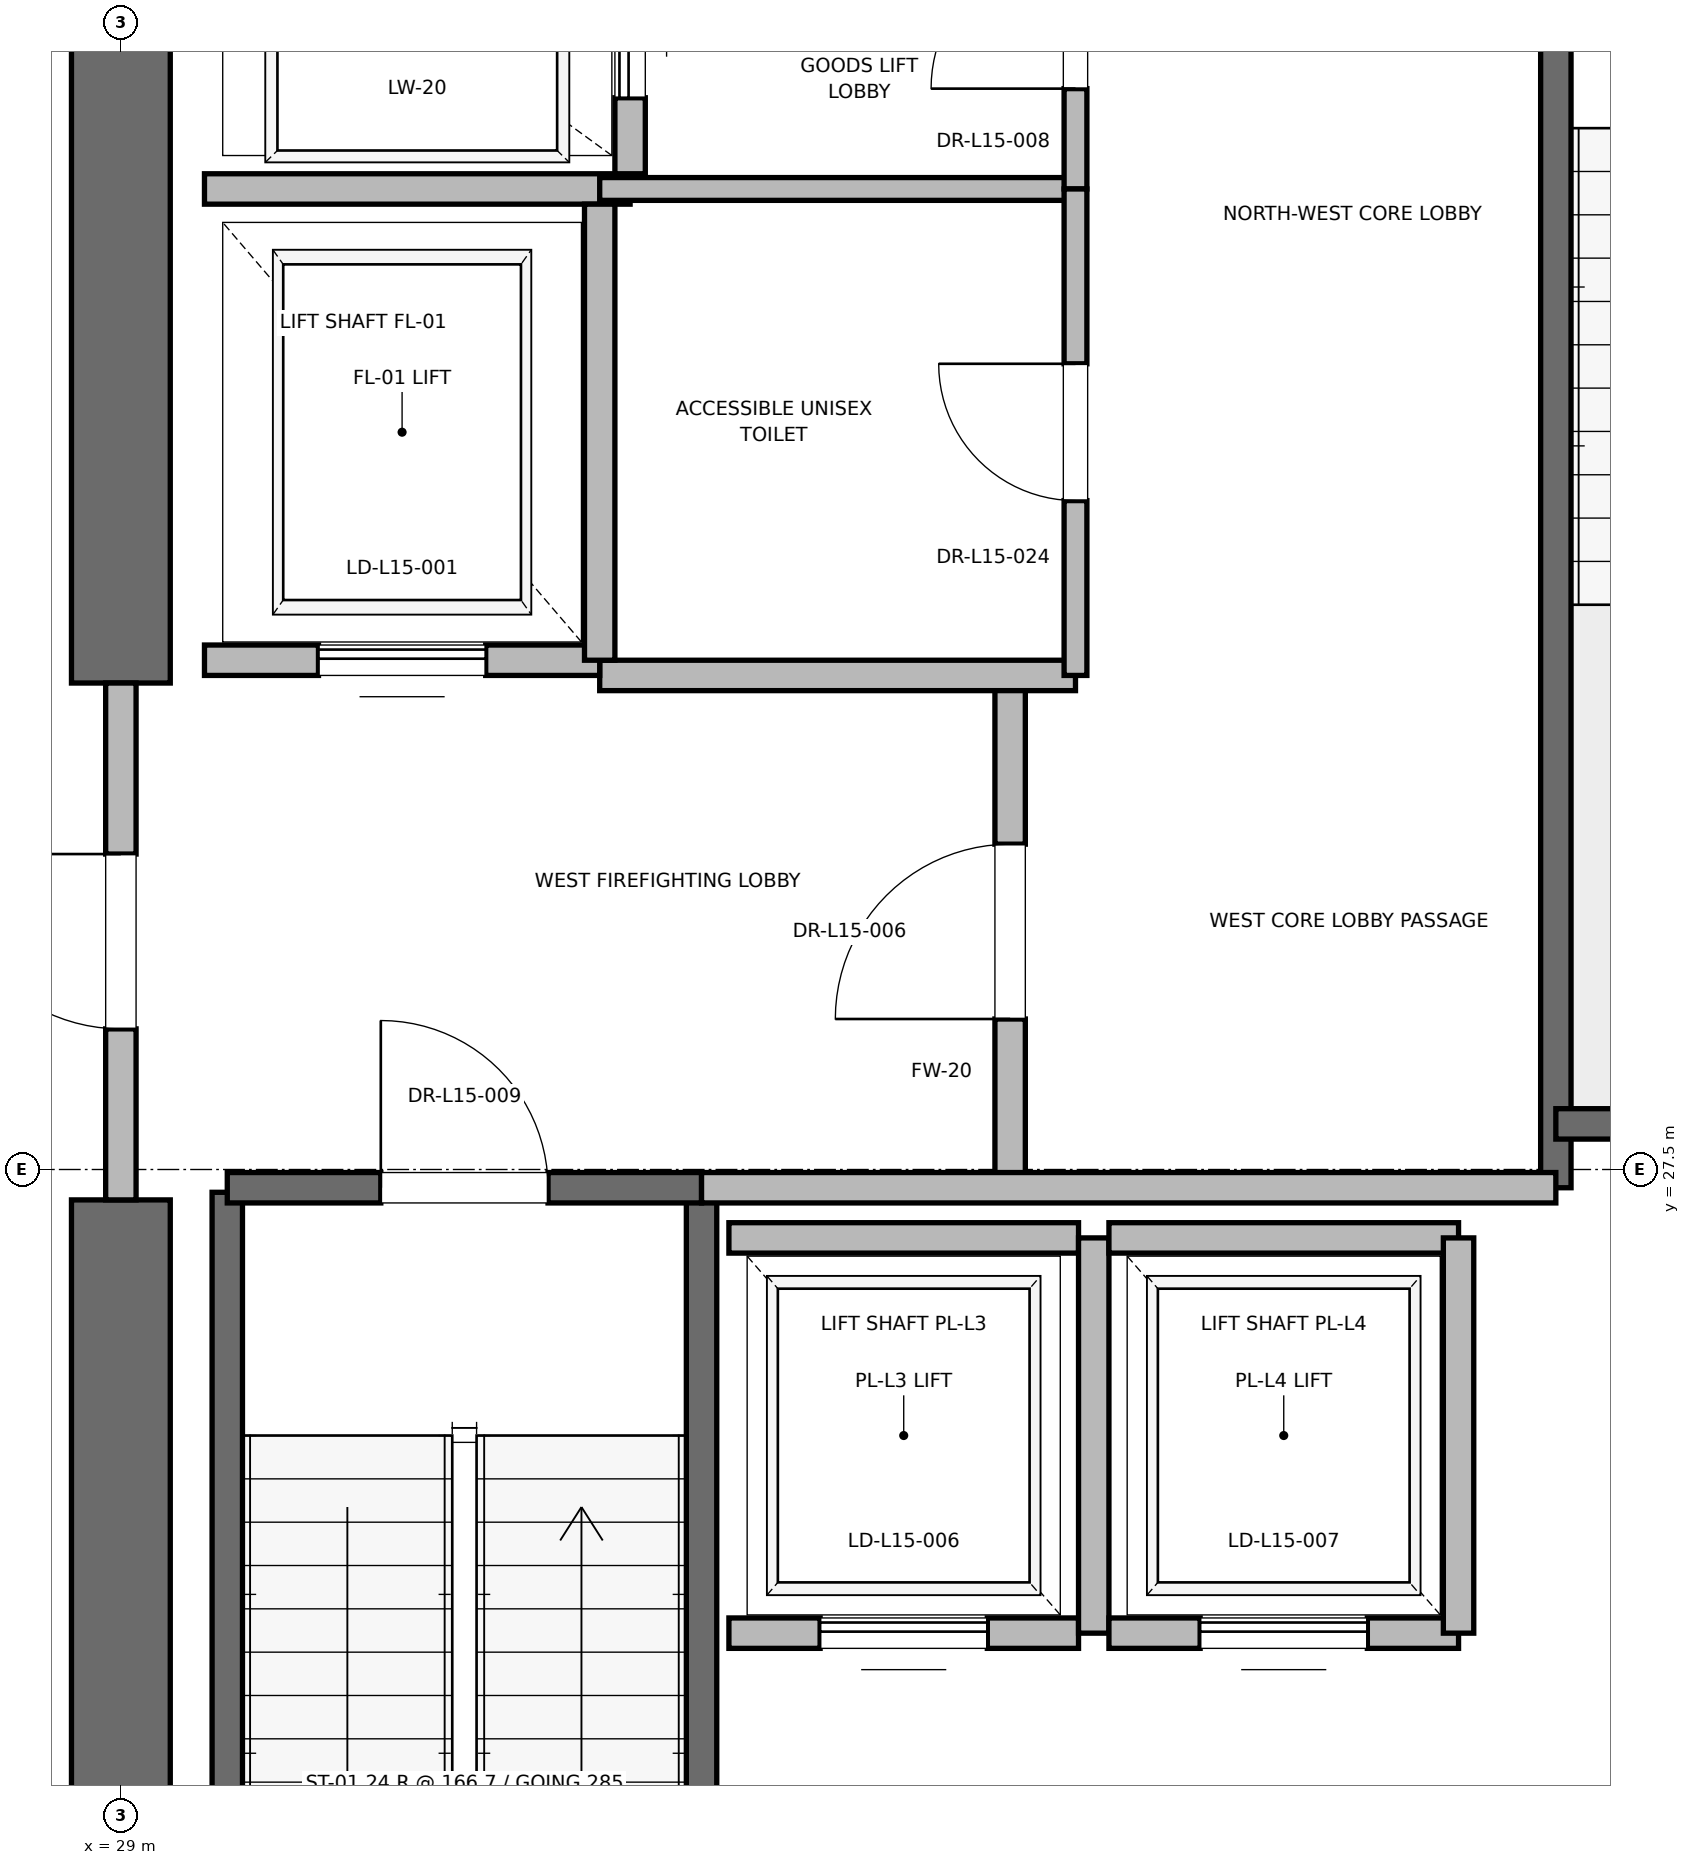
"""IFC4 building model, lengths in metres.
Left out: names, types, materials, properties, quantities, classifications, styles, units other than length and angle.
Written with IfcOpenShell. Run it as: python <this file> out.ifc"""

import sys

from ifc_helpers import new_model, si_unit, direction, frame, frame_2d, origin, place, context, subcontext, project, spatial, rectangle, extrude, element, fill, save


model = new_model("IFC4")
c1 = context("Model", 3, precision=1e-05, world=origin(), true_north=direction((0.0, 1.0)))
c2 = subcontext(c1, "Body", "Model", "MODEL_VIEW")
j1 = project(units=[si_unit("LENGTHUNIT", "METRE"), si_unit("PLANEANGLEUNIT", "RADIAN")], contexts=[c1])
p1 = place(None, origin())
s1 = spatial("IfcSite", under=j1, at=p1, CompositionType="ELEMENT")
p2 = place(p1, origin())
s2 = spatial("IfcBuilding", under=s1, at=p2, CompositionType="ELEMENT")
p3 = place(p2, frame((0.0, 0.0, 67.6)))
s3 = spatial("IfcBuildingStorey", under=s2, at=p3, CompositionType="ELEMENT", Elevation=67.6)
p4 = place(p3, frame((29.0, 18.5, 0.0), z_axis=(0.0, 0.0, 1.0), x_axis=(0.0, 1.0, 0.0)))
e1 = element("IfcWall", 1, at=p4, inside=s3, PredefinedType="SHEAR", context=c2, shape_type="SweptSolid", body=[
    extrude(rectangle(XDim=8.8, YDim=0.65, at=frame_2d((4.4, 0.0))), origin(), (0.0, 0.0, 1.0), 3.76),
])
p5 = place(p3, frame((29.0, 30.7, 0.0), z_axis=(0.0, 0.0, 1.0), x_axis=(0.0, 1.0, 0.0)))
e2 = element("IfcWall", 2, at=p5, inside=s3, PredefinedType="SHEAR", context=c2, shape_type="SweptSolid", body=[
    extrude(rectangle(XDim=5.8, YDim=0.65, at=frame_2d((2.9, 0.0))), origin(), (0.0, 0.0, 1.0), 3.76),
])
p6 = place(p3, frame((29.7, 19.2, 0.0), z_axis=(0.0, 0.0, 1.0), x_axis=(0.0, 1.0, 0.0)))
e3 = element("IfcWall", 3, at=p6, inside=s3, PredefinedType="SOLIDWALL", context=c2, shape_type="SweptSolid", body=[
    extrude(rectangle(XDim=8.15, YDim=0.2, at=frame_2d((4.075, 0.0))), origin(), (0.0, 0.0, 1.0), 3.76),
])
p7 = place(p3, frame((32.82, 18.6, 0.0), z_axis=(0.0, 0.0, 1.0), x_axis=(0.0, 1.0, 0.0)))
e4 = element("IfcWall", 4, at=p7, inside=s3, PredefinedType="SOLIDWALL", context=c2, shape_type="SweptSolid", body=[
    extrude(rectangle(XDim=8.78, YDim=0.2, at=frame_2d((4.39, 0.0))), origin(), (0.0, 0.0, 1.0), 3.76),
])
p8 = place(p3, frame((29.7, 27.38, 0.0), z_axis=(0.0, 0.0, 1.0), x_axis=(1.0, 0.0, 0.0)))
e5 = element("IfcWall", 5, at=p8, inside=s3, PredefinedType="SOLIDWALL", context=c2, shape_type="SweptSolid", body=[
    extrude(rectangle(XDim=3.12, YDim=0.2, at=frame_2d((1.56, 0.0))), origin(), (0.0, 0.0, 1.0), 3.76),
])
p9 = place(p8, frame((1.01, 0.0, 0.0)))
e6 = element("IfcOpeningElement", 6, at=p9, cuts=e5, PredefinedType="OPENING", context=c2, shape_type="SweptSolid", body=[
    extrude(rectangle(XDim=1.1, YDim=2.15, at=frame_2d((0.55, 1.075))), frame((0.0, 0.1, 0.0), z_axis=(0.0, -1.0, 0.0), x_axis=(1.0, 0.0, 0.0)), (0.0, 0.0, 1.0), 0.2),
])
p10 = place(p3, frame((38.44, 27.38, 0.0), z_axis=(0.0, 0.0, 1.0), x_axis=(0.0, 1.0, 0.0)))
e7 = element("IfcWall", 7, at=p10, inside=s3, PredefinedType="SOLIDWALL", context=c2, shape_type="SweptSolid", body=[
    extrude(rectangle(XDim=8.87, YDim=0.2, at=frame_2d((4.435, 0.0))), origin(), (0.0, 0.0, 1.0), 3.76),
])
p11 = place(p3, frame((38.44, 27.8, 0.0), z_axis=(0.0, 0.0, 1.0), x_axis=(1.0, 0.0, 0.0)))
e8 = element("IfcWall", 8, at=p11, inside=s3, PredefinedType="SOLIDWALL", context=c2, shape_type="SweptSolid", body=[
    extrude(rectangle(XDim=3.32, YDim=0.2, at=frame_2d((1.66, 0.0))), origin(), (0.0, 0.0, 1.0), 3.76),
])
p12 = place(p3, frame((34.85, 27.38, 0.0), z_axis=(0.0, 0.0, 1.0), x_axis=(0.0, 1.0, 0.0)))
e9 = element("IfcWall", 9, at=p12, inside=s3, PredefinedType="PARTITIONING", context=c2, shape_type="SweptSolid", body=[
    extrude(rectangle(XDim=3.37, YDim=0.2, at=frame_2d((1.685, 0.0))), origin(), (0.0, 0.0, 1.0), 3.76),
])
p13 = place(p12, frame((1.11, 0.0, 0.0)))
e10 = element("IfcOpeningElement", 10, at=p13, cuts=e9, PredefinedType="OPENING", context=c2, shape_type="SweptSolid", body=[
    extrude(rectangle(XDim=1.15, YDim=2.2, at=frame_2d((0.575, 1.1))), frame((0.0, 0.1, 0.0), z_axis=(0.0, -1.0, 0.0), x_axis=(1.0, 0.0, 0.0)), (0.0, 0.0, 1.0), 0.2),
])
p14 = place(p3, frame((29.0, 27.3, 0.0), z_axis=(0.0, 0.0, 1.0), x_axis=(0.0, 1.0, 0.0)))
e11 = element("IfcWall", 11, at=p14, inside=s3, PredefinedType="PARTITIONING", context=c2, shape_type="SweptSolid", body=[
    extrude(rectangle(XDim=3.4, YDim=0.2, at=frame_2d((1.7, 0.0))), origin(), (0.0, 0.0, 1.0), 2.54),
])
p15 = place(p14, frame((1.125, 0.0, 0.0)))
e12 = element("IfcOpeningElement", 12, at=p15, cuts=e11, PredefinedType="OPENING", context=c2, shape_type="SweptSolid", body=[
    extrude(rectangle(XDim=1.15, YDim=2.2, at=frame_2d((0.575, 1.1))), frame((0.0, 0.1, 0.0), z_axis=(0.0, -1.0, 0.0), x_axis=(1.0, 0.0, 0.0)), (0.0, 0.0, 1.0), 0.2),
])
p16 = place(p3, frame((32.82, 27.38, 0.0), z_axis=(0.0, 0.0, 1.0), x_axis=(1.0, 0.0, 0.0)))
e13 = element("IfcWall", 13, at=p16, inside=s3, PredefinedType="PARTITIONING", context=c2, shape_type="SweptSolid", body=[
    extrude(rectangle(XDim=5.62, YDim=0.2, at=frame_2d((2.81, 0.0))), origin(), (0.0, 0.0, 1.0), 3.76),
])
p17 = place(p3, frame((32.15, 30.75, 0.0), z_axis=(0.0, 0.0, 1.0), x_axis=(1.0, 0.0, 0.0)))
e14 = element("IfcWall", 14, at=p17, inside=s3, PredefinedType="PARTITIONING", context=c2, shape_type="SweptSolid", body=[
    extrude(rectangle(XDim=3.13, YDim=0.2, at=frame_2d((1.565, 0.0))), origin(), (0.0, 0.0, 1.0), 3.76),
])
p18 = place(p3, frame((29.55, 30.85, 0.0), z_axis=(0.0, 0.0, 1.0), x_axis=(1.0, 0.0, 0.0)))
e15 = element("IfcWall", 15, at=p18, inside=s3, PredefinedType="SOLIDWALL", context=c2, shape_type="SweptSolid", body=[
    extrude(rectangle(XDim=2.6, YDim=0.2, at=frame_2d((1.3, 0.0))), origin(), (0.0, 0.0, 1.0), 2.54),
])
p19 = place(p18, frame((0.75, 0.0, 0.0)))
e16 = element("IfcOpeningElement", 16, at=p19, cuts=e15, PredefinedType="OPENING", context=c2, shape_type="SweptSolid", body=[
    extrude(rectangle(XDim=1.1, YDim=2.2, at=frame_2d((0.55, 1.1))), frame((0.0, 0.1, 0.0), z_axis=(0.0, -1.0, 0.0), x_axis=(1.0, 0.0, 0.0)), (0.0, 0.0, 1.0), 0.2),
])
p20 = place(p3, frame((29.55, 33.95, 0.0), z_axis=(0.0, 0.0, 1.0), x_axis=(1.0, 0.0, 0.0)))
e17 = element("IfcWall", 17, at=p20, inside=s3, PredefinedType="SOLIDWALL", context=c2, shape_type="SweptSolid", body=[
    extrude(rectangle(XDim=2.8, YDim=0.2, at=frame_2d((1.4, 0.0))), origin(), (0.0, 0.0, 1.0), 3.76),
])
p21 = place(p3, frame((32.15, 30.85, 0.0), z_axis=(0.0, 0.0, 1.0), x_axis=(0.0, 1.0, 0.0)))
e18 = element("IfcWall", 18, at=p21, inside=s3, PredefinedType="SOLIDWALL", context=c2, shape_type="SweptSolid", body=[
    extrude(rectangle(XDim=3.0, YDim=0.2, at=frame_2d((1.5, 0.0))), origin(), (0.0, 0.0, 1.0), 3.76),
])
p22 = place(p3, frame((32.35, 34.05, 0.0), z_axis=(0.0, 0.0, 1.0), x_axis=(0.0, 1.0, 0.0)))
e19 = element("IfcWall", 19, at=p22, inside=s3, PredefinedType="SOLIDWALL", context=c2, shape_type="SweptSolid", body=[
    extrude(rectangle(XDim=2.1, YDim=0.2, at=frame_2d((1.05, 0.0))), origin(), (0.0, 0.0, 1.0), 3.76),
])
p23 = place(p22, frame((0.5, 0.0, 0.0)))
e20 = element("IfcOpeningElement", 20, at=p23, cuts=e19, PredefinedType="OPENING", context=c2, shape_type="SweptSolid", body=[
    extrude(rectangle(XDim=1.1, YDim=2.2, at=frame_2d((0.55, 1.1))), frame((0.0, 0.1, 0.0), z_axis=(0.0, -1.0, 0.0), x_axis=(1.0, 0.0, 0.0)), (0.0, 0.0, 1.0), 0.2),
])
p24 = place(p3, frame((33.0, 24.45, 0.0), z_axis=(0.0, 0.0, 1.0), x_axis=(1.0, 0.0, 0.0)))
e21 = element("IfcWall", 21, at=p24, inside=s3, PredefinedType="SOLIDWALL", context=c2, shape_type="SweptSolid", body=[
    extrude(rectangle(XDim=2.3, YDim=0.2, at=frame_2d((1.15, 0.0))), origin(), (0.0, 0.0, 1.0), 3.76),
])
p25 = place(p24, frame((0.6, 0.0, 0.0)))
e22 = element("IfcOpeningElement", 22, at=p25, cuts=e21, PredefinedType="OPENING", context=c2, shape_type="SweptSolid", body=[
    extrude(rectangle(XDim=1.1, YDim=2.2, at=frame_2d((0.55, 1.1))), frame((0.0, 0.1, 0.0), z_axis=(0.0, -1.0, 0.0), x_axis=(1.0, 0.0, 0.0)), (0.0, 0.0, 1.0), 0.2),
])
p26 = place(p3, frame((35.3, 27.05, 0.0), z_axis=(0.0, 0.0, 1.0), x_axis=(-1.0, 0.0, 0.0)))
e23 = element("IfcWall", 23, at=p26, inside=s3, PredefinedType="SOLIDWALL", context=c2, shape_type="SweptSolid", body=[
    extrude(rectangle(XDim=2.3, YDim=0.2, at=frame_2d((1.15, 0.0))), origin(), (0.0, 0.0, 1.0), 3.76),
])
p27 = place(p3, frame((35.4, 24.45, 0.0), z_axis=(0.0, 0.0, 1.0), x_axis=(0.0, 1.0, 0.0)))
e24 = element("IfcWall", 24, at=p27, inside=s3, PredefinedType="SOLIDWALL", context=c2, shape_type="SweptSolid", body=[
    extrude(rectangle(XDim=2.6, YDim=0.2, at=frame_2d((1.3, 0.0))), origin(), (0.0, 0.0, 1.0), 3.76),
])
p28 = place(p3, frame((35.5, 24.45, 0.0), z_axis=(0.0, 0.0, 1.0), x_axis=(1.0, 0.0, 0.0)))
e25 = element("IfcWall", 25, at=p28, inside=s3, PredefinedType="SOLIDWALL", context=c2, shape_type="SweptSolid", body=[
    extrude(rectangle(XDim=2.3, YDim=0.2, at=frame_2d((1.15, 0.0))), origin(), (0.0, 0.0, 1.0), 3.76),
])
p29 = place(p28, frame((0.6, 0.0, 0.0)))
e26 = element("IfcOpeningElement", 26, at=p29, cuts=e25, PredefinedType="OPENING", context=c2, shape_type="SweptSolid", body=[
    extrude(rectangle(XDim=1.1, YDim=2.2, at=frame_2d((0.55, 1.1))), frame((0.0, 0.1, 0.0), z_axis=(0.0, -1.0, 0.0), x_axis=(1.0, 0.0, 0.0)), (0.0, 0.0, 1.0), 0.2),
])
p30 = place(p3, frame((37.8, 27.05, 0.0), z_axis=(0.0, 0.0, 1.0), x_axis=(-1.0, 0.0, 0.0)))
e27 = element("IfcWall", 27, at=p30, inside=s3, PredefinedType="SOLIDWALL", context=c2, shape_type="SweptSolid", body=[
    extrude(rectangle(XDim=2.3, YDim=0.2, at=frame_2d((1.15, 0.0))), origin(), (0.0, 0.0, 1.0), 3.76),
])
p31 = place(p3, frame((37.8, 24.45, 0.0), z_axis=(0.0, 0.0, 1.0), x_axis=(0.0, 1.0, 0.0)))
e28 = element("IfcWall", 28, at=p31, inside=s3, PredefinedType="SOLIDWALL", context=c2, shape_type="SweptSolid", body=[
    extrude(rectangle(XDim=2.6, YDim=0.2, at=frame_2d((1.3, 0.0))), origin(), (0.0, 0.0, 1.0), 3.76),
])
p32 = place(p3, frame((32.15, 33.95, 0.0), z_axis=(0.0, 0.0, 1.0), x_axis=(1.0, 0.0, 0.0)))
e29 = element("IfcWall", 29, at=p32, inside=s3, PredefinedType="PARTITIONING", context=c2, shape_type="SweptSolid", body=[
    extrude(rectangle(XDim=3.13, YDim=0.15, at=frame_2d((1.565, 0.0))), origin(), (0.0, 0.0, 1.0), 2.85),
])
p33 = place(p3, frame((35.28, 33.95, 0.0), z_axis=(0.0, 0.0, 1.0), x_axis=(0.0, 1.0, 0.0)))
e30 = element("IfcWall", 30, at=p33, inside=s3, PredefinedType="PARTITIONING", context=c2, shape_type="SweptSolid", body=[
    extrude(rectangle(XDim=2.27, YDim=0.15, at=frame_2d((1.135, 0.0))), origin(), (0.0, 0.0, 1.0), 2.54),
])
p34 = place(p33, frame((0.66, 0.0, 0.0)))
e31 = element("IfcOpeningElement", 31, at=p34, cuts=e30, PredefinedType="OPENING", context=c2, shape_type="SweptSolid", body=[
    extrude(rectangle(XDim=0.95, YDim=2.15, at=frame_2d((0.475, 1.075))), frame((0.0, 0.075, 0.0), z_axis=(0.0, -1.0, 0.0), x_axis=(1.0, 0.0, 0.0)), (0.0, 0.0, 1.0), 0.15),
])
p35 = place(p3, frame((35.28, 30.75, 0.0), z_axis=(0.0, 0.0, 1.0), x_axis=(0.0, 1.0, 0.0)))
e32 = element("IfcWall", 32, at=p35, inside=s3, PredefinedType="PARTITIONING", context=c2, shape_type="SweptSolid", body=[
    extrude(rectangle(XDim=3.2, YDim=0.15, at=frame_2d((1.6, 0.0))), origin(), (0.0, 0.0, 1.0), 2.85),
])
p36 = place(p35, frame((1.15, 0.0, 0.0)))
e33 = element("IfcOpeningElement", 33, at=p36, cuts=e32, PredefinedType="OPENING", context=c2, shape_type="SweptSolid", body=[
    extrude(rectangle(XDim=0.9, YDim=2.1, at=frame_2d((0.45, 1.05))), frame((0.0, 0.075, 0.0), z_axis=(0.0, -1.0, 0.0), x_axis=(1.0, 0.0, 0.0)), (0.0, 0.0, 1.0), 0.15),
])
p37 = place(p9, origin())
e34 = element("IfcDoor", 34, at=p37, inside=s3, OperationType="SINGLE_SWING_LEFT", PredefinedType="DOOR", context=c2, shape_type="SweptSolid", body=[
    extrude(rectangle(XDim=1.1, YDim=2.15, at=frame_2d((0.55, 1.075))), frame((0.0, 0.025, 0.0), z_axis=(0.0, -1.0, 0.0), x_axis=(1.0, 0.0, 0.0)), (0.0, 0.0, 1.0), 0.05),
])
fill(e6, e34)
p38 = place(p13, origin())
e35 = element("IfcDoor", 35, at=p38, inside=s3, OperationType="SINGLE_SWING_LEFT", PredefinedType="DOOR", context=c2, shape_type="SweptSolid", body=[
    extrude(rectangle(XDim=1.15, YDim=2.2, at=frame_2d((0.575, 1.1))), frame((0.0, 0.025, 0.0), z_axis=(0.0, -1.0, 0.0), x_axis=(1.0, 0.0, 0.0)), (0.0, 0.0, 1.0), 0.05),
])
fill(e10, e35)
p39 = place(p15, origin())
e36 = element("IfcDoor", 36, at=p39, inside=s3, OperationType="SINGLE_SWING_RIGHT", PredefinedType="DOOR", context=c2, shape_type="SweptSolid", body=[
    extrude(rectangle(XDim=1.15, YDim=2.2, at=frame_2d((0.575, 1.1))), frame((0.0, 0.025, 0.0), z_axis=(0.0, -1.0, 0.0), x_axis=(1.0, 0.0, 0.0)), (0.0, 0.0, 1.0), 0.05),
])
fill(e12, e36)
p40 = place(p19, origin())
e37 = element("IfcDoor", 37, at=p40, inside=s3, OperationType="SLIDING_TO_RIGHT", PredefinedType="DOOR", context=c2, shape_type="SweptSolid", body=[
    extrude(rectangle(XDim=1.1, YDim=2.2, at=frame_2d((0.55, 1.1))), frame((0.0, 0.025, 0.0), z_axis=(0.0, -1.0, 0.0), x_axis=(1.0, 0.0, 0.0)), (0.0, 0.0, 1.0), 0.05),
])
fill(e16, e37)
p41 = place(p23, origin())
e38 = element("IfcDoor", 38, at=p41, inside=s3, OperationType="SLIDING_TO_RIGHT", PredefinedType="DOOR", context=c2, shape_type="SweptSolid", body=[
    extrude(rectangle(XDim=1.1, YDim=2.2, at=frame_2d((0.55, 1.1))), frame((0.0, 0.025, 0.0), z_axis=(0.0, -1.0, 0.0), x_axis=(1.0, 0.0, 0.0)), (0.0, 0.0, 1.0), 0.05),
])
fill(e20, e38)
p42 = place(p25, origin())
e39 = element("IfcDoor", 39, at=p42, inside=s3, OperationType="SLIDING_TO_RIGHT", PredefinedType="DOOR", context=c2, shape_type="SweptSolid", body=[
    extrude(rectangle(XDim=1.1, YDim=2.2, at=frame_2d((0.55, 1.1))), frame((0.0, 0.025, 0.0), z_axis=(0.0, -1.0, 0.0), x_axis=(1.0, 0.0, 0.0)), (0.0, 0.0, 1.0), 0.05),
])
fill(e22, e39)
p43 = place(p29, origin())
e40 = element("IfcDoor", 40, at=p43, inside=s3, OperationType="SLIDING_TO_RIGHT", PredefinedType="DOOR", context=c2, shape_type="SweptSolid", body=[
    extrude(rectangle(XDim=1.1, YDim=2.2, at=frame_2d((0.55, 1.1))), frame((0.0, 0.025, 0.0), z_axis=(0.0, -1.0, 0.0), x_axis=(1.0, 0.0, 0.0)), (0.0, 0.0, 1.0), 0.05),
])
fill(e26, e40)
p44 = place(p34, origin())
e41 = element("IfcDoor", 41, at=p44, inside=s3, OperationType="SINGLE_SWING_LEFT", PredefinedType="DOOR", context=c2, shape_type="SweptSolid", body=[
    extrude(rectangle(XDim=0.95, YDim=2.15, at=frame_2d((0.475, 1.075))), frame((0.0, 0.025, 0.0), z_axis=(0.0, -1.0, 0.0), x_axis=(1.0, 0.0, 0.0)), (0.0, 0.0, 1.0), 0.05),
])
fill(e31, e41)
p45 = place(p36, origin())
e42 = element("IfcDoor", 42, at=p45, inside=s3, OperationType="SINGLE_SWING_RIGHT", PredefinedType="DOOR", context=c2, shape_type="SweptSolid", body=[
    extrude(rectangle(XDim=0.9, YDim=2.1, at=frame_2d((0.45, 1.05))), frame((0.0, 0.025, 0.0), z_axis=(0.0, -1.0, 0.0), x_axis=(1.0, 0.0, 0.0)), (0.0, 0.0, 1.0), 0.05),
])
fill(e33, e42)
save(model, sys.argv[1])
